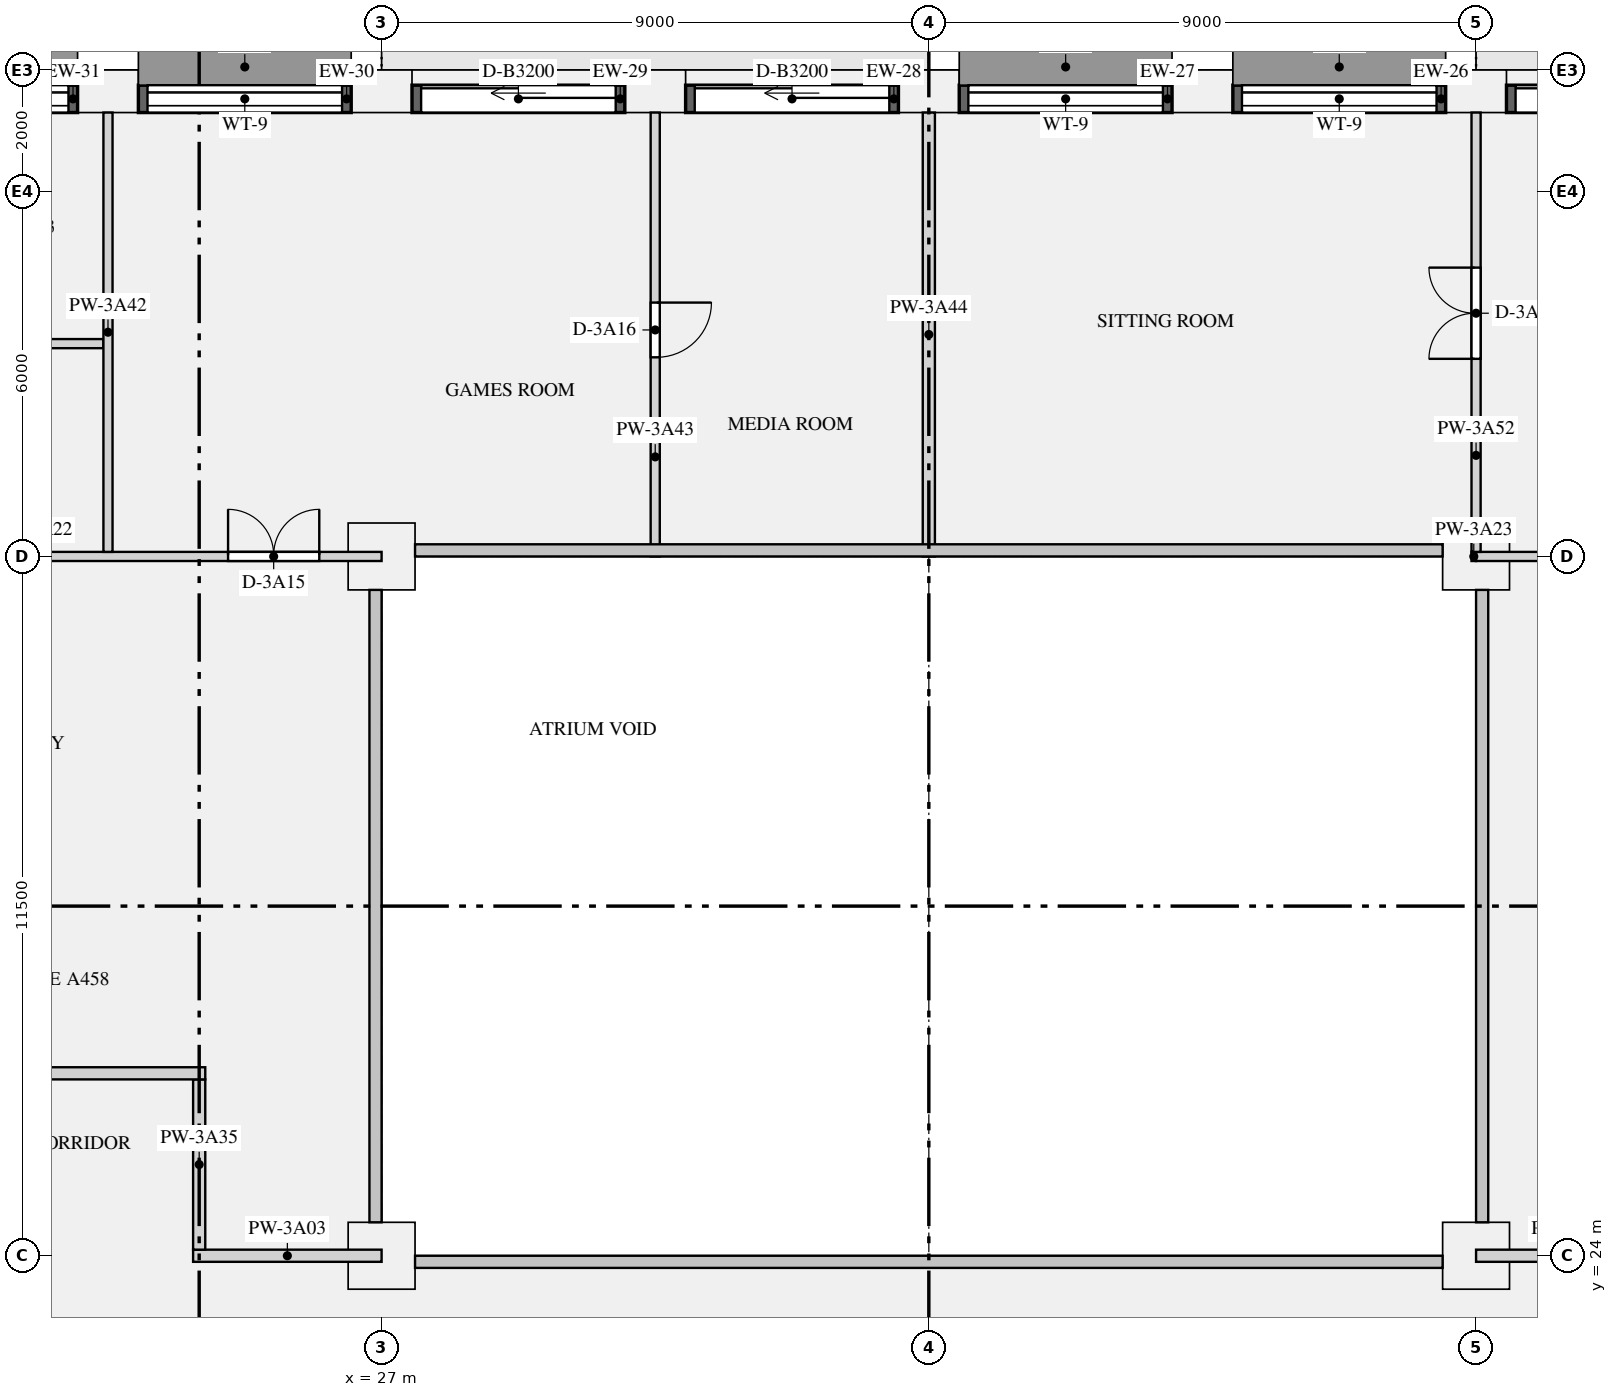
"""IFC4 building model, lengths in metres.
Left out: names, types, materials, properties, quantities, classifications, styles, units other than length and angle.
Written with IfcOpenShell. Run it as: python <this file> out.ifc"""

import sys

from ifc_helpers import new_model, si_unit, direction, frame, frame_2d, origin, origin_2d, place, context, subcontext, project, spatial, rectangle, extrude, element, fill, save


model = new_model("IFC4")
c1 = context("Model", 3, precision=1e-05, world=origin(), true_north=direction((0.0, 1.0)))
c2 = subcontext(c1, "Body", "Model", "MODEL_VIEW")
j1 = project(units=[si_unit("LENGTHUNIT", "METRE"), si_unit("PLANEANGLEUNIT", "RADIAN")], contexts=[c1])
p1 = place(None, origin())
s1 = spatial("IfcSite", under=j1, at=p1, CompositionType="ELEMENT")
p2 = place(p1, origin())
s2 = spatial("IfcBuilding", under=s1, at=p2, CompositionType="ELEMENT")
p3 = place(p2, frame((0.0, 0.0, 144.45)))
s3 = spatial("IfcBuildingStorey", under=s2, at=p3, CompositionType="ELEMENT", Elevation=144.45)
for number, where, z_axis, x_axis in (
    (1, (45.0, 43.15, 0.0), (0.0, 0.0, 1.0), (-1.0, 0.0, 0.0)),
    (2, (40.5, 43.15, 0.0), (0.0, 0.0, 1.0), (-1.0, 0.0, 0.0)),
    (3, (36.0, 43.15, 0.0), (0.0, 0.0, 1.0), (-1.0, 0.0, 0.0)),
    (4, (31.5, 43.15, 0.0), (0.0, 0.0, 1.0), (-1.0, 0.0, 0.0)),
    (5, (27.0, 43.15, 0.0), (0.0, 0.0, 1.0), (-1.0, 0.0, 0.0)),
    (6, (22.5, 43.15, 0.0), (0.0, 0.0, 1.0), (-1.0, 0.0, 0.0)),
):
    element("IfcColumn", number, at=place(p3, frame(where, z_axis=z_axis, x_axis=x_axis)), inside=s3, PredefinedType="USERDEFINED", context=c2, shape_type="SweptSolid", body=[
        extrude(rectangle(XDim=1.0, YDim=0.7, at=origin_2d()), origin(), (0.0, 0.0, 1.0), 3.15),
    ])
for number, where, z_axis, x_axis in (
    (7, (27.0, 24.0, 0.0), (0.0, 0.0, 1.0), (1.0, 0.0, 0.0)),
    (8, (45.0, 24.0, 0.0), (0.0, 0.0, 1.0), (1.0, 0.0, 0.0)),
    (9, (27.0, 35.5, 0.0), (0.0, 0.0, 1.0), (1.0, 0.0, 0.0)),
    (10, (45.0, 35.5, 0.0), (0.0, 0.0, 1.0), (1.0, 0.0, 0.0)),
):
    element("IfcColumn", number, at=place(p3, frame(where, z_axis=z_axis, x_axis=x_axis)), inside=s3, PredefinedType="COLUMN", context=c2, shape_type="SweptSolid", body=[
        extrude(rectangle(XDim=1.1, YDim=1.1, at=origin_2d()), origin(), (0.0, 0.0, 1.0), 3.15),
    ])
p4 = place(p3, frame((49.0, 43.025, 0.0), z_axis=(0.0, 0.0, 1.0), x_axis=(-1.0, 0.0, 0.0)))
e11 = element("IfcWall", 11, at=p4, inside=s3, PredefinedType="SOLIDWALL", context=c2, shape_type="SweptSolid", body=[
    extrude(rectangle(XDim=3.5, YDim=0.45, at=frame_2d((1.75, 0.0))), origin(), (0.0, 0.0, 1.0), 2.83),
])
p5 = place(p4, frame((0.15, 0.0, 0.0)))
e12 = element("IfcOpeningElement", 12, at=p5, cuts=e11, PredefinedType="OPENING", context=c2, shape_type="SweptSolid", body=[
    extrude(rectangle(XDim=3.2, YDim=2.3, at=frame_2d((1.6, 1.15))), frame((0.0, 0.235, 0.0), z_axis=(0.0, -1.0, 0.0), x_axis=(1.0, 0.0, 0.0)), (0.0, 0.0, 1.0), 0.47),
])
p6 = place(p3, frame((44.5, 43.025, 0.9), z_axis=(0.0, 0.0, 1.0), x_axis=(-1.0, 0.0, 0.0)))
e13 = element("IfcWall", 13, at=p6, inside=s3, PredefinedType="SOLIDWALL", context=c2, shape_type="SweptSolid", body=[
    extrude(rectangle(XDim=3.5, YDim=0.45, at=frame_2d((1.75, 0.0))), origin(), (0.0, 0.0, 1.0), 1.93),
])
p7 = place(p6, frame((0.15, 0.0, 0.15)))
e14 = element("IfcOpeningElement", 14, at=p7, cuts=e13, PredefinedType="OPENING", context=c2, shape_type="SweptSolid", body=[
    extrude(rectangle(XDim=3.2, YDim=1.5, at=frame_2d((1.6, 0.75))), frame((0.0, 0.235, 0.0), z_axis=(0.0, -1.0, 0.0), x_axis=(1.0, 0.0, 0.0)), (0.0, 0.0, 1.0), 0.47),
])
p8 = place(p3, frame((40.0, 43.025, 0.9), z_axis=(0.0, 0.0, 1.0), x_axis=(-1.0, 0.0, 0.0)))
e15 = element("IfcWall", 15, at=p8, inside=s3, PredefinedType="SOLIDWALL", context=c2, shape_type="SweptSolid", body=[
    extrude(rectangle(XDim=3.5, YDim=0.45, at=frame_2d((1.75, 0.0))), origin(), (0.0, 0.0, 1.0), 1.93),
])
p9 = place(p8, frame((0.15, 0.0, 0.15)))
e16 = element("IfcOpeningElement", 16, at=p9, cuts=e15, PredefinedType="OPENING", context=c2, shape_type="SweptSolid", body=[
    extrude(rectangle(XDim=3.2, YDim=1.5, at=frame_2d((1.6, 0.75))), frame((0.0, 0.235, 0.0), z_axis=(0.0, -1.0, 0.0), x_axis=(1.0, 0.0, 0.0)), (0.0, 0.0, 1.0), 0.47),
])
p10 = place(p3, frame((35.5, 43.025, 0.0), z_axis=(0.0, 0.0, 1.0), x_axis=(-1.0, 0.0, 0.0)))
e17 = element("IfcWall", 17, at=p10, inside=s3, PredefinedType="SOLIDWALL", context=c2, shape_type="SweptSolid", body=[
    extrude(rectangle(XDim=3.5, YDim=0.45, at=frame_2d((1.75, 0.0))), origin(), (0.0, 0.0, 1.0), 2.83),
])
p11 = place(p10, frame((0.15, 0.0, 0.0)))
e18 = element("IfcOpeningElement", 18, at=p11, cuts=e17, PredefinedType="OPENING", context=c2, shape_type="SweptSolid", body=[
    extrude(rectangle(XDim=3.2, YDim=2.3, at=frame_2d((1.6, 1.15))), frame((0.0, 0.235, 0.0), z_axis=(0.0, -1.0, 0.0), x_axis=(1.0, 0.0, 0.0)), (0.0, 0.0, 1.0), 0.47),
])
p12 = place(p3, frame((31.0, 43.025, 0.0), z_axis=(0.0, 0.0, 1.0), x_axis=(-1.0, 0.0, 0.0)))
e19 = element("IfcWall", 19, at=p12, inside=s3, PredefinedType="SOLIDWALL", context=c2, shape_type="SweptSolid", body=[
    extrude(rectangle(XDim=3.5, YDim=0.45, at=frame_2d((1.75, 0.0))), origin(), (0.0, 0.0, 1.0), 2.83),
])
p13 = place(p12, frame((0.15, 0.0, 0.0)))
e20 = element("IfcOpeningElement", 20, at=p13, cuts=e19, PredefinedType="OPENING", context=c2, shape_type="SweptSolid", body=[
    extrude(rectangle(XDim=3.2, YDim=2.3, at=frame_2d((1.6, 1.15))), frame((0.0, 0.235, 0.0), z_axis=(0.0, -1.0, 0.0), x_axis=(1.0, 0.0, 0.0)), (0.0, 0.0, 1.0), 0.47),
])
p14 = place(p3, frame((26.5, 43.025, 0.9), z_axis=(0.0, 0.0, 1.0), x_axis=(-1.0, 0.0, 0.0)))
e21 = element("IfcWall", 21, at=p14, inside=s3, PredefinedType="SOLIDWALL", context=c2, shape_type="SweptSolid", body=[
    extrude(rectangle(XDim=3.5, YDim=0.45, at=frame_2d((1.75, 0.0))), origin(), (0.0, 0.0, 1.0), 1.93),
])
p15 = place(p14, frame((0.15, 0.0, 0.15)))
e22 = element("IfcOpeningElement", 22, at=p15, cuts=e21, PredefinedType="OPENING", context=c2, shape_type="SweptSolid", body=[
    extrude(rectangle(XDim=3.2, YDim=1.5, at=frame_2d((1.6, 0.75))), frame((0.0, 0.235, 0.0), z_axis=(0.0, -1.0, 0.0), x_axis=(1.0, 0.0, 0.0)), (0.0, 0.0, 1.0), 0.47),
])
p16 = place(p3, frame((22.0, 43.025, 0.9), z_axis=(0.0, 0.0, 1.0), x_axis=(-1.0, 0.0, 0.0)))
e23 = element("IfcWall", 23, at=p16, inside=s3, PredefinedType="SOLIDWALL", context=c2, shape_type="SweptSolid", body=[
    extrude(rectangle(XDim=3.5, YDim=0.45, at=frame_2d((1.75, 0.0))), origin(), (0.0, 0.0, 1.0), 1.93),
])
p17 = place(p16, frame((0.15, 0.0, 0.15)))
e24 = element("IfcOpeningElement", 24, at=p17, cuts=e23, PredefinedType="OPENING", context=c2, shape_type="SweptSolid", body=[
    extrude(rectangle(XDim=3.2, YDim=1.5, at=frame_2d((1.6, 0.75))), frame((0.0, 0.235, 0.0), z_axis=(0.0, -1.0, 0.0), x_axis=(1.0, 0.0, 0.0)), (0.0, 0.0, 1.0), 0.47),
])
for number, where, z_axis, x_axis in (
    (25, (23.9, 24.0, 0.0), (0.0, 0.0, 1.0), (1.0, 0.0, 0.0)),
    (26, (45.0, 24.0, 0.0), (0.0, 0.0, 1.0), (1.0, 0.0, 0.0)),
):
    element("IfcWall", number, at=place(p3, frame(where, z_axis=z_axis, x_axis=x_axis)), inside=s3, PredefinedType="PARTITIONING", context=c2, shape_type="SweptSolid", body=[
        extrude(rectangle(XDim=3.1, YDim=0.2, at=frame_2d((1.55, 0.0))), origin(), (0.0, 0.0, 1.0), 2.83),
    ])
p18 = place(p3, frame((17.1, 27.0, 0.0), z_axis=(0.0, 0.0, 1.0), x_axis=(1.0, 0.0, 0.0)))
e27 = element("IfcWall", 27, at=p18, inside=s3, PredefinedType="PARTITIONING", context=c2, shape_type="SweptSolid", body=[
    extrude(rectangle(XDim=7.0, YDim=0.2, at=frame_2d((3.5, 0.0))), origin(), (0.0, 0.0, 1.0), 2.83),
])
p19 = place(p3, frame((18.075, 39.0, 0.0), z_axis=(0.0, 0.0, 1.0), x_axis=(1.0, 0.0, 0.0)))
e28 = element("IfcWall", 28, at=p19, inside=s3, PredefinedType="PARTITIONING", context=c2, shape_type="SweptSolid", body=[
    extrude(rectangle(XDim=4.35, YDim=0.15, at=frame_2d((2.175, 0.0))), origin(), (0.0, 0.0, 1.0), 2.83),
])
p20 = place(p3, frame((18.075, 35.5, 0.0), z_axis=(0.0, 0.0, 1.0), x_axis=(1.0, 0.0, 0.0)))
e29 = element("IfcWall", 29, at=p20, inside=s3, PredefinedType="PARTITIONING", context=c2, shape_type="SweptSolid", body=[
    extrude(rectangle(XDim=8.925, YDim=0.15, at=frame_2d((4.462, 0.0))), origin(), (0.0, 0.0, 1.0), 2.83),
])
p21 = place(p20, frame((6.4, 0.0, 0.0)))
e30 = element("IfcOpeningElement", 30, at=p21, cuts=e29, PredefinedType="OPENING", context=c2, shape_type="SweptSolid", body=[
    extrude(rectangle(XDim=1.5, YDim=2.1, at=frame_2d((0.75, 1.05))), frame((0.0, 0.085, 0.0), z_axis=(0.0, -1.0, 0.0), x_axis=(1.0, 0.0, 0.0)), (0.0, 0.0, 1.0), 0.17),
])
p22 = place(p3, frame((44.925, 35.5, 0.0), z_axis=(0.0, 0.0, 1.0), x_axis=(1.0, 0.0, 0.0)))
e31 = element("IfcWall", 31, at=p22, inside=s3, PredefinedType="PARTITIONING", context=c2, shape_type="SweptSolid", body=[
    extrude(rectangle(XDim=0.075, YDim=0.15, at=frame_2d((0.038, 0.0))), origin(), (0.0, 0.0, 1.0), 2.83),
])
p23 = place(p3, frame((45.0, 35.5, 0.0), z_axis=(0.0, 0.0, 1.0), x_axis=(1.0, 0.0, 0.0)))
e32 = element("IfcWall", 32, at=p23, inside=s3, PredefinedType="PARTITIONING", context=c2, shape_type="SweptSolid", body=[
    extrude(rectangle(XDim=8.925, YDim=0.15, at=frame_2d((4.462, 0.0))), origin(), (0.0, 0.0, 1.0), 2.83),
])
p24 = place(p23, frame((5.275, 0.0, 0.0)))
e33 = element("IfcOpeningElement", 33, at=p24, cuts=e32, PredefinedType="OPENING", context=c2, shape_type="SweptSolid", body=[
    extrude(rectangle(XDim=0.9, YDim=2.1, at=frame_2d((0.45, 1.05))), frame((0.0, 0.085, 0.0), z_axis=(0.0, -1.0, 0.0), x_axis=(1.0, 0.0, 0.0)), (0.0, 0.0, 1.0), 0.17),
])
p25 = place(p23, frame((1.325, 0.0, 0.0)))
e34 = element("IfcOpeningElement", 34, at=p25, cuts=e32, PredefinedType="OPENING", context=c2, shape_type="SweptSolid", body=[
    extrude(rectangle(XDim=0.9, YDim=2.1, at=frame_2d((0.45, 1.05))), frame((0.0, 0.085, 0.0), z_axis=(0.0, -1.0, 0.0), x_axis=(1.0, 0.0, 0.0)), (0.0, 0.0, 1.0), 0.17),
])
p26 = place(p3, frame((24.0, 24.1, 0.0), z_axis=(0.0, 0.0, 1.0), x_axis=(0.0, 1.0, 0.0)))
e35 = element("IfcWall", 35, at=p26, inside=s3, PredefinedType="PARTITIONING", context=c2, shape_type="SweptSolid", body=[
    extrude(rectangle(XDim=2.8, YDim=0.2, at=frame_2d((1.4, 0.0))), origin(), (0.0, 0.0, 1.0), 2.83),
])
p27 = place(p3, frame((22.5, 35.575, 0.0), z_axis=(0.0, 0.0, 1.0), x_axis=(0.0, 1.0, 0.0)))
e36 = element("IfcWall", 36, at=p27, inside=s3, PredefinedType="PARTITIONING", context=c2, shape_type="SweptSolid", body=[
    extrude(rectangle(XDim=7.225, YDim=0.15, at=frame_2d((3.613, 0.0))), origin(), (0.0, 0.0, 1.0), 2.83),
])
p28 = place(p3, frame((31.5, 35.5, 0.0), z_axis=(0.0, 0.0, 1.0), x_axis=(0.0, 1.0, 0.0)))
e37 = element("IfcWall", 37, at=p28, inside=s3, PredefinedType="PARTITIONING", context=c2, shape_type="SweptSolid", body=[
    extrude(rectangle(XDim=7.3, YDim=0.15, at=frame_2d((3.65, 0.0))), origin(), (0.0, 0.0, 1.0), 2.83),
])
p29 = place(p28, frame((3.275, 0.0, 0.0)))
e38 = element("IfcOpeningElement", 38, at=p29, cuts=e37, PredefinedType="OPENING", context=c2, shape_type="SweptSolid", body=[
    extrude(rectangle(XDim=0.9, YDim=2.1, at=frame_2d((0.45, 1.05))), frame((0.0, 0.085, 0.0), z_axis=(0.0, -1.0, 0.0), x_axis=(1.0, 0.0, 0.0)), (0.0, 0.0, 1.0), 0.17),
])
p30 = place(p3, frame((36.0, 35.5, 0.0), z_axis=(0.0, 0.0, 1.0), x_axis=(0.0, 1.0, 0.0)))
e39 = element("IfcWall", 39, at=p30, inside=s3, PredefinedType="PARTITIONING", context=c2, shape_type="SweptSolid", body=[
    extrude(rectangle(XDim=7.3, YDim=0.2, at=frame_2d((3.65, 0.0))), origin(), (0.0, 0.0, 1.0), 2.83),
])
p31 = place(p3, frame((45.0, 35.575, 0.0), z_axis=(0.0, 0.0, 1.0), x_axis=(0.0, 1.0, 0.0)))
e40 = element("IfcWall", 40, at=p31, inside=s3, PredefinedType="PARTITIONING", context=c2, shape_type="SweptSolid", body=[
    extrude(rectangle(XDim=7.225, YDim=0.15, at=frame_2d((3.613, 0.0))), origin(), (0.0, 0.0, 1.0), 2.83),
])
p32 = place(p31, frame((3.175, 0.0, 0.0)))
e41 = element("IfcOpeningElement", 41, at=p32, cuts=e40, PredefinedType="OPENING", context=c2, shape_type="SweptSolid", body=[
    extrude(rectangle(XDim=1.5, YDim=2.1, at=frame_2d((0.75, 1.05))), frame((0.0, 0.085, 0.0), z_axis=(0.0, -1.0, 0.0), x_axis=(1.0, 0.0, 0.0)), (0.0, 0.0, 1.0), 0.17),
])
p33 = place(p5, origin())
e42 = element("IfcDoor", 42, at=p33, inside=s3, OperationType="SLIDING_TO_LEFT", PredefinedType="DOOR", context=c2, shape_type="SweptSolid", body=[
    extrude(rectangle(XDim=3.2, YDim=2.3, at=frame_2d((1.6, 1.15))), frame((0.0, -0.07, 0.0), z_axis=(0.0, -1.0, 0.0), x_axis=(1.0, 0.0, 0.0)), (0.0, 0.0, 1.0), 0.05),
])
fill(e12, e42)
p34 = place(p7, origin())
e43 = element("IfcWindow", 43, at=p34, inside=s3, PartitioningType="SINGLE_PANEL", PredefinedType="WINDOW", context=c2, shape_type="SweptSolid", body=[
    extrude(rectangle(XDim=3.2, YDim=1.5, at=frame_2d((1.6, 0.75))), frame((0.0, -0.065, 0.0), z_axis=(0.0, -1.0, 0.0), x_axis=(1.0, 0.0, 0.0)), (0.0, 0.0, 1.0), 0.06),
])
fill(e14, e43)
p35 = place(p9, origin())
e44 = element("IfcWindow", 44, at=p35, inside=s3, PartitioningType="SINGLE_PANEL", PredefinedType="WINDOW", context=c2, shape_type="SweptSolid", body=[
    extrude(rectangle(XDim=3.2, YDim=1.5, at=frame_2d((1.6, 0.75))), frame((0.0, -0.065, 0.0), z_axis=(0.0, -1.0, 0.0), x_axis=(1.0, 0.0, 0.0)), (0.0, 0.0, 1.0), 0.06),
])
fill(e16, e44)
p36 = place(p11, origin())
e45 = element("IfcDoor", 45, at=p36, inside=s3, OperationType="SLIDING_TO_LEFT", PredefinedType="DOOR", context=c2, shape_type="SweptSolid", body=[
    extrude(rectangle(XDim=3.2, YDim=2.3, at=frame_2d((1.6, 1.15))), frame((0.0, -0.07, 0.0), z_axis=(0.0, -1.0, 0.0), x_axis=(1.0, 0.0, 0.0)), (0.0, 0.0, 1.0), 0.05),
])
fill(e18, e45)
p37 = place(p13, origin())
e46 = element("IfcDoor", 46, at=p37, inside=s3, OperationType="SLIDING_TO_LEFT", PredefinedType="DOOR", context=c2, shape_type="SweptSolid", body=[
    extrude(rectangle(XDim=3.2, YDim=2.3, at=frame_2d((1.6, 1.15))), frame((0.0, -0.07, 0.0), z_axis=(0.0, -1.0, 0.0), x_axis=(1.0, 0.0, 0.0)), (0.0, 0.0, 1.0), 0.05),
])
fill(e20, e46)
p38 = place(p15, origin())
e47 = element("IfcWindow", 47, at=p38, inside=s3, PartitioningType="SINGLE_PANEL", PredefinedType="WINDOW", context=c2, shape_type="SweptSolid", body=[
    extrude(rectangle(XDim=3.2, YDim=1.5, at=frame_2d((1.6, 0.75))), frame((0.0, -0.065, 0.0), z_axis=(0.0, -1.0, 0.0), x_axis=(1.0, 0.0, 0.0)), (0.0, 0.0, 1.0), 0.06),
])
fill(e22, e47)
p39 = place(p17, origin())
e48 = element("IfcWindow", 48, at=p39, inside=s3, PartitioningType="SINGLE_PANEL", PredefinedType="WINDOW", context=c2, shape_type="SweptSolid", body=[
    extrude(rectangle(XDim=3.2, YDim=1.5, at=frame_2d((1.6, 0.75))), frame((0.0, -0.065, 0.0), z_axis=(0.0, -1.0, 0.0), x_axis=(1.0, 0.0, 0.0)), (0.0, 0.0, 1.0), 0.06),
])
fill(e24, e48)
p40 = place(p21, origin())
e49 = element("IfcDoor", 49, at=p40, inside=s3, OperationType="DOUBLE_DOOR_SINGLE_SWING", PredefinedType="DOOR", context=c2, shape_type="SweptSolid", body=[
    extrude(rectangle(XDim=1.5, YDim=2.1, at=frame_2d((0.75, 1.05))), frame((0.0, 0.025, 0.0), z_axis=(0.0, -1.0, 0.0), x_axis=(1.0, 0.0, 0.0)), (0.0, 0.0, 1.0), 0.05),
])
fill(e30, e49)
p41 = place(p29, frame((0.9, 0.0, 0.0), z_axis=(0.0, 0.0, 1.0), x_axis=(-1.0, 0.0, 0.0)))
e50 = element("IfcDoor", 50, at=p41, inside=s3, OperationType="SINGLE_SWING_LEFT", PredefinedType="DOOR", context=c2, shape_type="SweptSolid", body=[
    extrude(rectangle(XDim=0.9, YDim=2.1, at=frame_2d((0.45, 1.05))), frame((0.0, 0.025, 0.0), z_axis=(0.0, -1.0, 0.0), x_axis=(1.0, 0.0, 0.0)), (0.0, 0.0, 1.0), 0.05),
])
fill(e38, e50)
p42 = place(p32, origin())
e51 = element("IfcDoor", 51, at=p42, inside=s3, OperationType="DOUBLE_DOOR_SINGLE_SWING", PredefinedType="DOOR", context=c2, shape_type="SweptSolid", body=[
    extrude(rectangle(XDim=1.5, YDim=2.1, at=frame_2d((0.75, 1.05))), frame((0.0, 0.025, 0.0), z_axis=(0.0, -1.0, 0.0), x_axis=(1.0, 0.0, 0.0)), (0.0, 0.0, 1.0), 0.05),
])
fill(e41, e51)
save(model, sys.argv[1])
